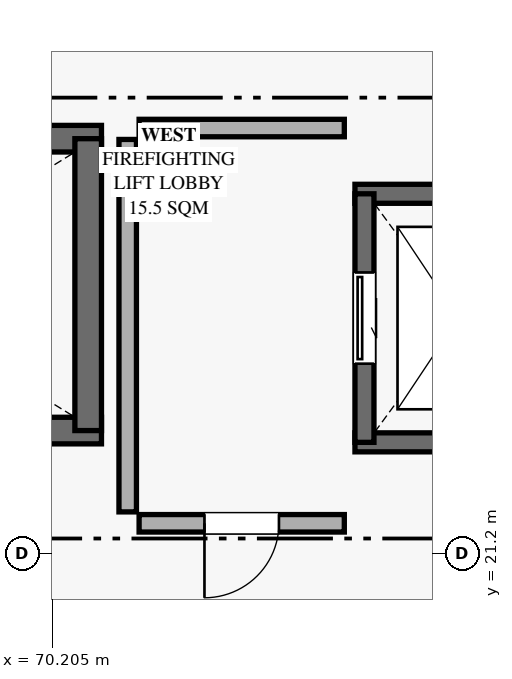
"""IFC4 building model, lengths in metres.
Left out: names, types, materials, properties, quantities, classifications, styles, units other than length and angle.
Written with IfcOpenShell. Run it as: python <this file> out.ifc"""

import sys

from ifc_helpers import new_model, si_unit, direction, frame, frame_2d, origin, place, context, subcontext, project, spatial, rectangle, extrude, element, fill, save


model = new_model("IFC4")
c1 = context("Model", 3, precision=1e-05, world=origin(), true_north=direction((0.0, 1.0)))
c2 = subcontext(c1, "Body", "Model", "MODEL_VIEW")
j1 = project(units=[si_unit("LENGTHUNIT", "METRE"), si_unit("PLANEANGLEUNIT", "RADIAN")], contexts=[c1])
p1 = place(None, origin())
s1 = spatial("IfcSite", under=j1, at=p1, CompositionType="ELEMENT")
p2 = place(p1, origin())
s2 = spatial("IfcBuilding", under=s1, at=p2, CompositionType="ELEMENT")
p3 = place(p2, frame((0.0, 0.0, 37.62)))
s3 = spatial("IfcBuildingStorey", under=s2, at=p3, CompositionType="ELEMENT", Elevation=37.62)
for number, where, z_axis, x_axis in (
    (1, (70.855, 22.82, 0.0), (0.0, 0.0, 1.0), (-1.0, 0.0, 0.0)),
    (2, (62.845, 26.66, 0.0), (0.0, 0.0, 1.0), (1.0, 0.0, 0.0)),
):
    element("IfcWall", number, at=place(p3, frame(where, z_axis=z_axis, x_axis=x_axis)), inside=s3, PredefinedType="SHEAR", context=c2, shape_type="SweptSolid", body=[
        extrude(rectangle(XDim=8.01, YDim=0.35, at=frame_2d((4.005, 0.0))), origin(), (0.0, 0.0, 1.0), 4.05),
    ])
p4 = place(p3, frame((70.68, 26.66, 0.0), z_axis=(0.0, 0.0, 1.0), x_axis=(0.0, -1.0, 0.0)))
e3 = element("IfcWall", 3, at=p4, inside=s3, PredefinedType="SHEAR", context=c2, shape_type="SweptSolid", body=[
    extrude(rectangle(XDim=3.84, YDim=0.35, at=frame_2d((1.92, 0.0))), origin(), (0.0, 0.0, 1.0), 4.05),
])
for number, where, z_axis, x_axis in (
    (4, (76.91, 22.665, 0.0), (0.0, 0.0, 1.0), (-1.0, 0.0, 0.0)),
    (5, (74.19, 25.935, 0.0), (0.0, 0.0, 1.0), (1.0, 0.0, 0.0)),
):
    element("IfcWall", number, at=place(p3, frame(where, z_axis=z_axis, x_axis=x_axis)), inside=s3, PredefinedType="SHEAR", context=c2, shape_type="SweptSolid", body=[
        extrude(rectangle(XDim=2.72, YDim=0.25, at=frame_2d((1.36, 0.0))), origin(), (0.0, 0.0, 1.0), 4.05),
    ])
p5 = place(p3, frame((74.315, 22.665, 0.0), z_axis=(0.0, 0.0, 1.0), x_axis=(0.0, 1.0, 0.0)))
e6 = element("IfcWall", 6, at=p5, inside=s3, PredefinedType="SHEAR", context=c2, shape_type="SweptSolid", body=[
    extrude(rectangle(XDim=3.27, YDim=0.25, at=frame_2d((1.635, 0.0))), origin(), (0.0, 0.0, 1.0), 4.05),
])
p6 = place(p5, frame((1.035, 0.0, 0.0)))
e7 = element("IfcOpeningElement", 7, at=p6, cuts=e6, PredefinedType="OPENING", context=c2, shape_type="SweptSolid", body=[
    extrude(rectangle(XDim=1.2, YDim=2.25, at=frame_2d((0.6, 1.125))), frame((0.0, 0.135, 0.0), z_axis=(0.0, -1.0, 0.0), x_axis=(1.0, 0.0, 0.0)), (0.0, 0.0, 1.0), 0.27),
])
p7 = place(p3, frame((74.05, 21.6, 0.0), z_axis=(0.0, 0.0, 1.0), x_axis=(-1.0, 0.0, 0.0)))
e8 = element("IfcWall", 8, at=p7, inside=s3, PredefinedType="PARTITIONING", context=c2, shape_type="SweptSolid", body=[
    extrude(rectangle(XDim=2.7, YDim=0.23, at=frame_2d((1.35, 0.0))), origin(), (0.0, 0.0, 1.0), 2.8),
])
p8 = place(p7, frame((0.86, 0.0, 0.0)))
e9 = element("IfcOpeningElement", 9, at=p8, cuts=e8, PredefinedType="OPENING", context=c2, shape_type="SweptSolid", body=[
    extrude(rectangle(XDim=0.98, YDim=2.12, at=frame_2d((0.49, 1.06))), frame((0.0, 0.125, 0.0), z_axis=(0.0, -1.0, 0.0), x_axis=(1.0, 0.0, 0.0)), (0.0, 0.0, 1.0), 0.25),
])
p9 = place(p3, frame((71.35, 26.8, 0.0), z_axis=(0.0, 0.0, 1.0), x_axis=(1.0, 0.0, 0.0)))
e10 = element("IfcWall", 10, at=p9, inside=s3, PredefinedType="PARTITIONING", context=c2, shape_type="SweptSolid", body=[
    extrude(rectangle(XDim=2.7, YDim=0.23, at=frame_2d((1.35, 0.0))), origin(), (0.0, 0.0, 1.0), 2.8),
])
p10 = place(p3, frame((71.2, 21.75, 0.0), z_axis=(0.0, 0.0, 1.0), x_axis=(0.0, 1.0, 0.0)))
e11 = element("IfcWall", 11, at=p10, inside=s3, PredefinedType="PARTITIONING", context=c2, shape_type="SweptSolid", body=[
    extrude(rectangle(XDim=4.9, YDim=0.23, at=frame_2d((2.45, 0.0))), origin(), (0.0, 0.0, 1.0), 2.8),
])
p11 = place(p6, origin())
e12 = element("IfcDoor", 12, at=p11, inside=s3, OperationType="SLIDING_TO_LEFT", PredefinedType="DOOR", context=c2, shape_type="SweptSolid", body=[
    extrude(rectangle(XDim=1.2, YDim=2.25, at=frame_2d((0.6, 1.125))), frame((0.0, 0.025, 0.0), z_axis=(0.0, -1.0, 0.0), x_axis=(1.0, 0.0, 0.0)), (0.0, 0.0, 1.0), 0.05),
])
fill(e7, e12)
p12 = place(p8, origin())
e13 = element("IfcDoor", 13, at=p12, inside=s3, OperationType="SINGLE_SWING_RIGHT", PredefinedType="DOOR", context=c2, shape_type="SweptSolid", body=[
    extrude(rectangle(XDim=0.98, YDim=2.12, at=frame_2d((0.49, 1.06))), frame((0.0, 0.025, 0.0), z_axis=(0.0, -1.0, 0.0), x_axis=(1.0, 0.0, 0.0)), (0.0, 0.0, 1.0), 0.05),
])
fill(e9, e13)
save(model, sys.argv[1])
